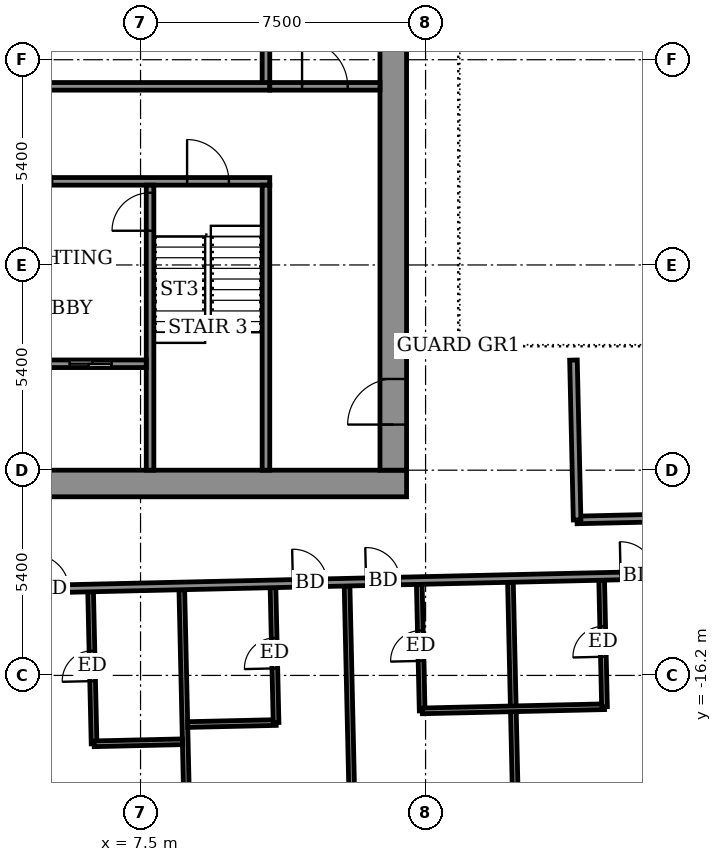
"""IFC4 building model, lengths in metres.
Left out: names, types, materials, properties, quantities, classifications, styles, units other than length and angle.
Written with IfcOpenShell. Run it as: python <this file> out.ifc"""

import sys

from ifc_helpers import new_model, si_unit, direction, frame, frame_2d, origin, place, context, subcontext, project, spatial, rectangle, extrude, element, fill, save


model = new_model("IFC4")
c1 = context("Model", 3, precision=1e-05, world=origin(), true_north=direction((0.0, 1.0)))
c2 = subcontext(c1, "Body", "Model", "MODEL_VIEW")
j1 = project(units=[si_unit("LENGTHUNIT", "METRE"), si_unit("PLANEANGLEUNIT", "RADIAN")], contexts=[c1])
p1 = place(None, origin())
s1 = spatial("IfcSite", under=j1, at=p1, CompositionType="ELEMENT")
p2 = place(p1, origin())
s2 = spatial("IfcBuilding", under=s1, at=p2, CompositionType="ELEMENT")
p3 = place(p2, frame((0.0, 0.0, 287.1)))
s3 = spatial("IfcBuildingStorey", under=s2, at=p3, CompositionType="ELEMENT", Elevation=287.1)
p4 = place(p3, frame((8.82, -24.293, 0.0), z_axis=(0.0, 0.0, 1.0), x_axis=(-0.022622273571, 0.999744083623, 0.0)))
e1 = element("IfcWall", 1, at=p4, inside=s3, PredefinedType="PARTITIONING", context=c2, shape_type="SweptSolid", body=[
    extrude(rectangle(XDim=10.35, YDim=0.15, at=frame_2d((5.175, 0.0))), origin(), (0.0, 0.0, 1.0), 2.5),
])
p5 = place(p3, frame((13.169, -24.194, 0.0), z_axis=(0.0, 0.0, 1.0), x_axis=(-0.022692470342, 0.99974249274, 0.0)))
e2 = element("IfcWall", 2, at=p5, inside=s3, PredefinedType="PARTITIONING", context=c2, shape_type="SweptSolid", body=[
    extrude(rectangle(XDim=10.35, YDim=0.15, at=frame_2d((5.175, 0.0))), origin(), (0.0, 0.0, 1.0), 2.5),
])
p6 = place(p3, frame((17.468, -24.097, 0.0), z_axis=(0.0, 0.0, 1.0), x_axis=(-0.022714440015, 0.999741993824, 0.0)))
e3 = element("IfcWall", 3, at=p6, inside=s3, PredefinedType="PARTITIONING", context=c2, shape_type="SweptSolid", body=[
    extrude(rectangle(XDim=10.351, YDim=0.15, at=frame_2d((5.175, 0.0))), origin(), (0.0, 0.0, 1.0), 2.5),
])
p7 = place(p3, frame((6.277, -17.999, 0.0), z_axis=(0.0, 0.0, 1.0), x_axis=(-0.022765770952, 0.999740826251, 0.0)))
e4 = element("IfcWall", 4, at=p7, inside=s3, PredefinedType="PARTITIONING", context=c2, shape_type="SweptSolid", body=[
    extrude(rectangle(XDim=4.0, YDim=0.15, at=frame_2d((2.0, 0.0))), origin(), (0.0, 0.0, 1.0), 3.05),
])
p8 = place(p7, frame((1.65, 0.0, 0.0)))
e5 = element("IfcOpeningElement", 5, at=p8, cuts=e4, PredefinedType="OPENING", context=c2, shape_type="SweptSolid", body=[
    extrude(rectangle(XDim=0.8, YDim=2.1, at=frame_2d((0.4, 1.05))), frame((0.0, 0.085, 0.0), z_axis=(0.0, -1.0, 0.0), x_axis=(1.0, 0.0, 0.0)), (0.0, 0.0, 1.0), 0.17),
])
p9 = place(p3, frame((6.279, -17.999, 0.0), z_axis=(0.0, 0.0, 1.0), x_axis=(0.999740260747, 0.02279059109, 0.0)))
e6 = element("IfcWall", 6, at=p9, inside=s3, PredefinedType="PARTITIONING", context=c2, shape_type="SweptSolid", body=[
    extrude(rectangle(XDim=2.324, YDim=0.15, at=frame_2d((1.162, 0.0))), origin(), (0.0, 0.0, 1.0), 3.05),
])
p10 = place(p3, frame((8.743, -17.493, 0.0), z_axis=(0.0, 0.0, 1.0), x_axis=(0.99974053329, 0.022778632478, 0.0)))
e7 = element("IfcWall", 7, at=p10, inside=s3, PredefinedType="PARTITIONING", context=c2, shape_type="SweptSolid", body=[
    extrude(rectangle(XDim=2.326, YDim=0.15, at=frame_2d((1.163, 0.0))), origin(), (0.0, 0.0, 1.0), 3.05),
])
p11 = place(p3, frame((11.066, -17.44, 0.0), z_axis=(0.0, 0.0, 1.0), x_axis=(-0.022765149847, 0.999740840394, 0.0)))
e8 = element("IfcWall", 8, at=p11, inside=s3, PredefinedType="PARTITIONING", context=c2, shape_type="SweptSolid", body=[
    extrude(rectangle(XDim=3.55, YDim=0.15, at=frame_2d((1.775, 0.0))), origin(), (0.0, 0.0, 1.0), 3.05),
])
p12 = place(p11, frame((1.425, 0.0, 0.0)))
e9 = element("IfcOpeningElement", 9, at=p12, cuts=e8, PredefinedType="OPENING", context=c2, shape_type="SweptSolid", body=[
    extrude(rectangle(XDim=0.8, YDim=2.1, at=frame_2d((0.4, 1.05))), frame((0.0, 0.085, 0.0), z_axis=(0.0, -1.0, 0.0), x_axis=(1.0, 0.0, 0.0)), (0.0, 0.0, 1.0), 0.17),
])
p13 = place(p3, frame((14.91, -17.133, 0.0), z_axis=(0.0, 0.0, 1.0), x_axis=(-0.022801345323, 0.99974001553, 0.0)))
e10 = element("IfcWall", 10, at=p13, inside=s3, PredefinedType="PARTITIONING", context=c2, shape_type="SweptSolid", body=[
    extrude(rectangle(XDim=3.33, YDim=0.15, at=frame_2d((1.665, 0.0))), origin(), (0.0, 0.0, 1.0), 3.05),
])
p14 = place(p13, frame((1.315, 0.0, 0.0)))
e11 = element("IfcOpeningElement", 11, at=p14, cuts=e10, PredefinedType="OPENING", context=c2, shape_type="SweptSolid", body=[
    extrude(rectangle(XDim=0.8, YDim=2.1, at=frame_2d((0.4, 1.05))), frame((0.0, 0.085, 0.0), z_axis=(0.0, -1.0, 0.0), x_axis=(1.0, 0.0, 0.0)), (0.0, 0.0, 1.0), 0.17),
])
p15 = place(p3, frame((14.912, -17.133, 0.0), z_axis=(0.0, 0.0, 1.0), x_axis=(0.999741415159, 0.022739894798, 0.0)))
e12 = element("IfcWall", 12, at=p15, inside=s3, PredefinedType="PARTITIONING", context=c2, shape_type="SweptSolid", body=[
    extrude(rectangle(XDim=4.799, YDim=0.15, at=frame_2d((2.399, 0.0))), origin(), (0.0, 0.0, 1.0), 3.05),
])
p16 = place(p3, frame((19.708, -17.024, 0.0), z_axis=(0.0, 0.0, 1.0), x_axis=(-0.022509879905, 0.999746620553, 0.0)))
e13 = element("IfcWall", 13, at=p16, inside=s3, PredefinedType="PARTITIONING", context=c2, shape_type="SweptSolid", body=[
    extrude(rectangle(XDim=3.33, YDim=0.15, at=frame_2d((1.665, 0.0))), origin(), (0.0, 0.0, 1.0), 3.05),
])
p17 = place(p16, frame((1.315, 0.0, 0.0)))
e14 = element("IfcOpeningElement", 14, at=p17, cuts=e13, PredefinedType="OPENING", context=c2, shape_type="SweptSolid", body=[
    extrude(rectangle(XDim=0.8, YDim=2.1, at=frame_2d((0.4, 1.05))), frame((0.0, 0.085, 0.0), z_axis=(0.0, -1.0, 0.0), x_axis=(1.0, 0.0, 0.0)), (0.0, 0.0, 1.0), 0.17),
])
p18 = place(p3, frame((-25.731, -14.624, 0.0), z_axis=(0.0, 0.0, 1.0), x_axis=(0.999742799525, 0.022678950563, 0.0)))
e15 = element("IfcWall", 15, at=p18, inside=s3, PredefinedType="PARTITIONING", context=c2, shape_type="SweptSolid", body=[
    extrude(rectangle(XDim=55.386, YDim=0.2, at=frame_2d((27.693, 0.0))), origin(), (0.0, 0.0, 1.0), 3.05),
])
p19 = place(p18, frame((3.149, 0.0, 0.0)))
e16 = element("IfcOpeningElement", 16, at=p19, cuts=e15, PredefinedType="OPENING", context=c2, shape_type="SweptSolid", body=[
    extrude(rectangle(XDim=1.0, YDim=2.1, at=frame_2d((0.5, 1.05))), frame((0.0, 0.11, 0.0), z_axis=(0.0, -1.0, 0.0), x_axis=(1.0, 0.0, 0.0)), (0.0, 0.0, 1.0), 0.22),
])
p20 = place(p18, frame((11.1, 0.0, 0.0)))
e17 = element("IfcOpeningElement", 17, at=p20, cuts=e15, PredefinedType="OPENING", context=c2, shape_type="SweptSolid", body=[
    extrude(rectangle(XDim=0.9, YDim=2.1, at=frame_2d((0.45, 1.05))), frame((0.0, 0.11, 0.0), z_axis=(0.0, -1.0, 0.0), x_axis=(1.0, 0.0, 0.0)), (0.0, 0.0, 1.0), 0.22),
])
p21 = place(p18, frame((12.95, 0.0, 0.0)))
e18 = element("IfcOpeningElement", 18, at=p21, cuts=e15, PredefinedType="OPENING", context=c2, shape_type="SweptSolid", body=[
    extrude(rectangle(XDim=0.9, YDim=2.1, at=frame_2d((0.45, 1.05))), frame((0.0, 0.11, 0.0), z_axis=(0.0, -1.0, 0.0), x_axis=(1.0, 0.0, 0.0)), (0.0, 0.0, 1.0), 0.22),
])
p22 = place(p18, frame((19.675, 0.0, 0.0)))
e19 = element("IfcOpeningElement", 19, at=p22, cuts=e15, PredefinedType="OPENING", context=c2, shape_type="SweptSolid", body=[
    extrude(rectangle(XDim=0.9, YDim=2.1, at=frame_2d((0.45, 1.05))), frame((0.0, 0.11, 0.0), z_axis=(0.0, -1.0, 0.0), x_axis=(1.0, 0.0, 0.0)), (0.0, 0.0, 1.0), 0.22),
])
p23 = place(p18, frame((21.7, 0.0, 0.0)))
e20 = element("IfcOpeningElement", 20, at=p23, cuts=e15, PredefinedType="OPENING", context=c2, shape_type="SweptSolid", body=[
    extrude(rectangle(XDim=0.9, YDim=2.1, at=frame_2d((0.45, 1.05))), frame((0.0, 0.11, 0.0), z_axis=(0.0, -1.0, 0.0), x_axis=(1.0, 0.0, 0.0)), (0.0, 0.0, 1.0), 0.22),
])
p24 = place(p18, frame((28.475, 0.0, 0.0)))
e21 = element("IfcOpeningElement", 21, at=p24, cuts=e15, PredefinedType="OPENING", context=c2, shape_type="SweptSolid", body=[
    extrude(rectangle(XDim=0.9, YDim=2.1, at=frame_2d((0.45, 1.05))), frame((0.0, 0.11, 0.0), z_axis=(0.0, -1.0, 0.0), x_axis=(1.0, 0.0, 0.0)), (0.0, 0.0, 1.0), 0.22),
])
p25 = place(p18, frame((30.45, 0.0, 0.0)))
e22 = element("IfcOpeningElement", 22, at=p25, cuts=e15, PredefinedType="OPENING", context=c2, shape_type="SweptSolid", body=[
    extrude(rectangle(XDim=0.9, YDim=2.1, at=frame_2d((0.45, 1.05))), frame((0.0, 0.11, 0.0), z_axis=(0.0, -1.0, 0.0), x_axis=(1.0, 0.0, 0.0)), (0.0, 0.0, 1.0), 0.22),
])
p26 = place(p18, frame((37.25, 0.0, 0.0)))
e23 = element("IfcOpeningElement", 23, at=p26, cuts=e15, PredefinedType="OPENING", context=c2, shape_type="SweptSolid", body=[
    extrude(rectangle(XDim=0.9, YDim=2.1, at=frame_2d((0.45, 1.05))), frame((0.0, 0.11, 0.0), z_axis=(0.0, -1.0, 0.0), x_axis=(1.0, 0.0, 0.0)), (0.0, 0.0, 1.0), 0.22),
])
p27 = place(p18, frame((39.175, 0.0, 0.0)))
e24 = element("IfcOpeningElement", 24, at=p27, cuts=e15, PredefinedType="OPENING", context=c2, shape_type="SweptSolid", body=[
    extrude(rectangle(XDim=0.9, YDim=2.1, at=frame_2d((0.45, 1.05))), frame((0.0, 0.11, 0.0), z_axis=(0.0, -1.0, 0.0), x_axis=(1.0, 0.0, 0.0)), (0.0, 0.0, 1.0), 0.22),
])
p28 = place(p18, frame((45.875, 0.0, 0.0)))
e25 = element("IfcOpeningElement", 25, at=p28, cuts=e15, PredefinedType="OPENING", context=c2, shape_type="SweptSolid", body=[
    extrude(rectangle(XDim=0.9, YDim=2.1, at=frame_2d((0.45, 1.05))), frame((0.0, 0.11, 0.0), z_axis=(0.0, -1.0, 0.0), x_axis=(1.0, 0.0, 0.0)), (0.0, 0.0, 1.0), 0.22),
])
p29 = place(p18, frame((51.127, 0.0, 0.0)))
e26 = element("IfcOpeningElement", 26, at=p29, cuts=e15, PredefinedType="OPENING", context=c2, shape_type="SweptSolid", body=[
    extrude(rectangle(XDim=1.0, YDim=2.1, at=frame_2d((0.5, 1.05))), frame((0.0, 0.11, 0.0), z_axis=(0.0, -1.0, 0.0), x_axis=(1.0, 0.0, 0.0)), (0.0, 0.0, 1.0), 0.22),
])
p30 = place(p3, frame((18.985, -12.109, 0.0), z_axis=(0.0, 0.0, 1.0), x_axis=(0.999742771882, 0.022680169073, 0.0)))
e27 = element("IfcWall", 27, at=p30, inside=s3, PredefinedType="PARTITIONING", context=c2, shape_type="SweptSolid", body=[
    extrude(rectangle(XDim=10.625, YDim=0.2, at=frame_2d((5.312, 0.0))), origin(), (0.0, 0.0, 1.0), 3.05),
])
p31 = place(p30, frame((5.75, 0.0, 0.0)))
e28 = element("IfcOpeningElement", 28, at=p31, cuts=e27, PredefinedType="OPENING", context=c2, shape_type="SweptSolid", body=[
    extrude(rectangle(XDim=1.0, YDim=2.1, at=frame_2d((0.5, 1.05))), frame((0.0, 0.11, 0.0), z_axis=(0.0, -1.0, 0.0), x_axis=(1.0, 0.0, 0.0)), (0.0, 0.0, 1.0), 0.22),
])
p32 = place(p3, frame((18.987, -12.109, 0.0), z_axis=(0.0, 0.0, 1.0), x_axis=(-0.022807092041, 0.999739884446, 0.0)))
e29 = element("IfcWall", 29, at=p32, inside=s3, PredefinedType="PARTITIONING", context=c2, shape_type="SweptSolid", body=[
    extrude(rectangle(XDim=4.207, YDim=0.2, at=frame_2d((2.104, 0.0))), origin(), (0.0, 0.0, 1.0), 3.05),
])
p33 = place(p3, frame((-14.5, -11.15, 0.0), z_axis=(0.0, 0.0, 1.0), x_axis=(1.0, 0.0, 0.0)))
e30 = element("IfcWall", 30, at=p33, inside=s3, PredefinedType="SHEAR", context=c2, shape_type="SweptSolid", body=[
    extrude(rectangle(XDim=29.0, YDim=0.7, at=frame_2d((14.5, 0.0))), origin(), (0.0, 0.0, 1.0), 3.6),
])
p34 = place(p3, frame((14.15, -10.8, 0.0), z_axis=(0.0, 0.0, 1.0), x_axis=(0.0, 1.0, 0.0)))
e31 = element("IfcWall", 31, at=p34, inside=s3, PredefinedType="SHEAR", context=c2, shape_type="SweptSolid", body=[
    extrude(rectangle(XDim=21.6, YDim=0.7, at=frame_2d((10.8, 0.0))), origin(), (0.0, 0.0, 1.0), 3.6),
])
p35 = place(p34, frame((1.2, 0.0, 0.0)))
e32 = element("IfcOpeningElement", 32, at=p35, cuts=e31, PredefinedType="OPENING", context=c2, shape_type="SweptSolid", body=[
    extrude(rectangle(XDim=1.2, YDim=2.1, at=frame_2d((0.6, 1.05))), frame((0.0, 0.36, 0.0), z_axis=(0.0, -1.0, 0.0), x_axis=(1.0, 0.0, 0.0)), (0.0, 0.0, 1.0), 0.72),
])
p36 = place(p3, frame((-10.9, -3.2, 0.0), z_axis=(0.0, 0.0, 1.0), x_axis=(1.0, 0.0, 0.0)))
e33 = element("IfcWall", 33, at=p36, inside=s3, PredefinedType="SHEAR", context=c2, shape_type="SweptSolid", body=[
    extrude(rectangle(XDim=21.8, YDim=0.2, at=frame_2d((10.9, 0.0))), origin(), (0.0, 0.0, 1.0), 3.05),
])
p37 = place(p36, frame((1.075, 0.0, 0.0)))
e34 = element("IfcOpeningElement", 34, at=p37, cuts=e33, PredefinedType="OPENING", context=c2, shape_type="SweptSolid", body=[
    extrude(rectangle(XDim=1.1, YDim=2.1, at=frame_2d((0.55, 1.05))), frame((0.0, 0.11, 0.0), z_axis=(0.0, -1.0, 0.0), x_axis=(1.0, 0.0, 0.0)), (0.0, 0.0, 1.0), 0.22),
])
p38 = place(p36, frame((10.325, 0.0, 0.0)))
e35 = element("IfcOpeningElement", 35, at=p38, cuts=e33, PredefinedType="OPENING", context=c2, shape_type="SweptSolid", body=[
    extrude(rectangle(XDim=1.1, YDim=2.1, at=frame_2d((0.55, 1.05))), frame((0.0, 0.11, 0.0), z_axis=(0.0, -1.0, 0.0), x_axis=(1.0, 0.0, 0.0)), (0.0, 0.0, 1.0), 0.22),
])
p39 = place(p36, frame((19.625, 0.0, 0.0)))
e36 = element("IfcOpeningElement", 36, at=p39, cuts=e33, PredefinedType="OPENING", context=c2, shape_type="SweptSolid", body=[
    extrude(rectangle(XDim=1.1, YDim=2.1, at=frame_2d((0.55, 1.05))), frame((0.0, 0.11, 0.0), z_axis=(0.0, -1.0, 0.0), x_axis=(1.0, 0.0, 0.0)), (0.0, 0.0, 1.0), 0.22),
])
p40 = place(p36, frame((5.7, 0.0, 0.0)))
e37 = element("IfcOpeningElement", 37, at=p40, cuts=e33, PredefinedType="OPENING", context=c2, shape_type="SweptSolid", body=[
    extrude(rectangle(XDim=1.1, YDim=2.1, at=frame_2d((0.55, 1.05))), frame((0.0, 0.11, 0.0), z_axis=(0.0, -1.0, 0.0), x_axis=(1.0, 0.0, 0.0)), (0.0, 0.0, 1.0), 0.22),
])
p41 = place(p36, frame((14.975, 0.0, 0.0)))
e38 = element("IfcOpeningElement", 38, at=p41, cuts=e33, PredefinedType="OPENING", context=c2, shape_type="SweptSolid", body=[
    extrude(rectangle(XDim=1.1, YDim=2.1, at=frame_2d((0.55, 1.05))), frame((0.0, 0.11, 0.0), z_axis=(0.0, -1.0, 0.0), x_axis=(1.0, 0.0, 0.0)), (0.0, 0.0, 1.0), 0.22),
])
p42 = place(p3, frame((-10.9, -0.7, 0.0), z_axis=(0.0, 0.0, 1.0), x_axis=(1.0, 0.0, 0.0)))
e39 = element("IfcWall", 39, at=p42, inside=s3, PredefinedType="SHEAR", context=c2, shape_type="SweptSolid", body=[
    extrude(rectangle(XDim=21.8, YDim=0.2, at=frame_2d((10.9, 0.0))), origin(), (0.0, 0.0, 1.0), 3.05),
])
p43 = place(p3, frame((7.75, -10.8, 0.0), z_axis=(0.0, 0.0, 1.0), x_axis=(0.0, 1.0, 0.0)))
e40 = element("IfcWall", 40, at=p43, inside=s3, PredefinedType="SHEAR", context=c2, shape_type="SweptSolid", body=[
    extrude(rectangle(XDim=7.5, YDim=0.2, at=frame_2d((3.75, 0.0))), origin(), (0.0, 0.0, 1.0), 3.05),
])
p44 = place(p43, frame((6.3, 0.0, 0.0)))
e41 = element("IfcOpeningElement", 41, at=p44, cuts=e40, PredefinedType="OPENING", context=c2, shape_type="SweptSolid", body=[
    extrude(rectangle(XDim=1.0, YDim=2.1, at=frame_2d((0.5, 1.05))), frame((0.0, 0.11, 0.0), z_axis=(0.0, -1.0, 0.0), x_axis=(1.0, 0.0, 0.0)), (0.0, 0.0, 1.0), 0.22),
])
p45 = place(p3, frame((10.8, -10.8, 0.0), z_axis=(0.0, 0.0, 1.0), x_axis=(0.0, 1.0, 0.0)))
e42 = element("IfcWall", 42, at=p45, inside=s3, PredefinedType="SHEAR", context=c2, shape_type="SweptSolid", body=[
    extrude(rectangle(XDim=7.5, YDim=0.2, at=frame_2d((3.75, 0.0))), origin(), (0.0, 0.0, 1.0), 3.05),
])
p46 = place(p3, frame((1.6, -8.0, 0.0), z_axis=(0.0, 0.0, 1.0), x_axis=(1.0, 0.0, 0.0)))
e43 = element("IfcWall", 43, at=p46, inside=s3, PredefinedType="SHEAR", context=c2, shape_type="SweptSolid", body=[
    extrude(rectangle(XDim=6.05, YDim=0.2, at=frame_2d((3.025, 0.0))), origin(), (0.0, 0.0, 1.0), 3.05),
])
p47 = place(p46, frame((0.913, 0.0, 0.0)))
e44 = element("IfcOpeningElement", 44, at=p47, cuts=e43, PredefinedType="OPENING", context=c2, shape_type="SweptSolid", body=[
    extrude(rectangle(XDim=1.1, YDim=2.1, at=frame_2d((0.55, 1.05))), frame((0.0, 0.11, 0.0), z_axis=(0.0, -1.0, 0.0), x_axis=(1.0, 0.0, 0.0)), (0.0, 0.0, 1.0), 0.22),
])
p48 = place(p46, frame((4.038, 0.0, 0.0)))
e45 = element("IfcOpeningElement", 45, at=p48, cuts=e43, PredefinedType="OPENING", context=c2, shape_type="SweptSolid", body=[
    extrude(rectangle(XDim=1.1, YDim=2.1, at=frame_2d((0.55, 1.05))), frame((0.0, 0.11, 0.0), z_axis=(0.0, -1.0, 0.0), x_axis=(1.0, 0.0, 0.0)), (0.0, 0.0, 1.0), 0.22),
])
p49 = place(p3, frame((10.8, -0.6, 0.0), z_axis=(0.0, 0.0, 1.0), x_axis=(0.0, 1.0, 0.0)))
e46 = element("IfcWall", 46, at=p49, inside=s3, PredefinedType="STANDARD", context=c2, shape_type="SweptSolid", body=[
    extrude(rectangle(XDim=2.5, YDim=0.2, at=frame_2d((1.25, 0.0))), origin(), (0.0, 0.0, 1.0), 3.05),
])
p50 = place(p3, frame((10.9, -0.7, 0.0), z_axis=(0.0, 0.0, 1.0), x_axis=(1.0, 0.0, 0.0)))
e47 = element("IfcWall", 47, at=p50, inside=s3, PredefinedType="STANDARD", context=c2, shape_type="SweptSolid", body=[
    extrude(rectangle(XDim=2.9, YDim=0.2, at=frame_2d((1.45, 0.0))), origin(), (0.0, 0.0, 1.0), 3.05),
])
p51 = place(p50, frame((0.85, 0.0, 0.0)))
e48 = element("IfcOpeningElement", 48, at=p51, cuts=e47, PredefinedType="OPENING", context=c2, shape_type="SweptSolid", body=[
    extrude(rectangle(XDim=1.2, YDim=2.1, at=frame_2d((0.6, 1.05))), frame((0.0, 0.11, 0.0), z_axis=(0.0, -1.0, 0.0), x_axis=(1.0, 0.0, 0.0)), (0.0, 0.0, 1.0), 0.22),
])
p52 = place(p25, origin())
e49 = element("IfcDoor", 49, at=p52, inside=s3, OperationType="SINGLE_SWING_RIGHT", PredefinedType="DOOR", context=c2, shape_type="SweptSolid", body=[
    extrude(rectangle(XDim=0.9, YDim=2.1, at=frame_2d((0.45, 1.05))), frame((0.0, 0.025, 0.0), z_axis=(0.0, -1.0, 0.0), x_axis=(1.0, 0.0, 0.0)), (0.0, 0.0, 1.0), 0.05),
])
fill(e22, e49)
p53 = place(p8, origin())
e50 = element("IfcDoor", 50, at=p53, inside=s3, OperationType="SINGLE_SWING_RIGHT", PredefinedType="DOOR", context=c2, shape_type="SweptSolid", body=[
    extrude(rectangle(XDim=0.8, YDim=2.1, at=frame_2d((0.4, 1.05))), frame((0.0, 0.025, 0.0), z_axis=(0.0, -1.0, 0.0), x_axis=(1.0, 0.0, 0.0)), (0.0, 0.0, 1.0), 0.05),
])
fill(e5, e50)
p54 = place(p26, origin())
e51 = element("IfcDoor", 51, at=p54, inside=s3, OperationType="SINGLE_SWING_LEFT", PredefinedType="DOOR", context=c2, shape_type="SweptSolid", body=[
    extrude(rectangle(XDim=0.9, YDim=2.1, at=frame_2d((0.45, 1.05))), frame((0.0, 0.025, 0.0), z_axis=(0.0, -1.0, 0.0), x_axis=(1.0, 0.0, 0.0)), (0.0, 0.0, 1.0), 0.05),
])
fill(e23, e51)
p55 = place(p12, origin())
e52 = element("IfcDoor", 52, at=p55, inside=s3, OperationType="SINGLE_SWING_LEFT", PredefinedType="DOOR", context=c2, shape_type="SweptSolid", body=[
    extrude(rectangle(XDim=0.8, YDim=2.1, at=frame_2d((0.4, 1.05))), frame((0.0, 0.025, 0.0), z_axis=(0.0, -1.0, 0.0), x_axis=(1.0, 0.0, 0.0)), (0.0, 0.0, 1.0), 0.05),
])
fill(e9, e52)
p56 = place(p27, origin())
e53 = element("IfcDoor", 53, at=p56, inside=s3, OperationType="SINGLE_SWING_RIGHT", PredefinedType="DOOR", context=c2, shape_type="SweptSolid", body=[
    extrude(rectangle(XDim=0.9, YDim=2.1, at=frame_2d((0.45, 1.05))), frame((0.0, 0.025, 0.0), z_axis=(0.0, -1.0, 0.0), x_axis=(1.0, 0.0, 0.0)), (0.0, 0.0, 1.0), 0.05),
])
fill(e24, e53)
p57 = place(p14, origin())
e54 = element("IfcDoor", 54, at=p57, inside=s3, OperationType="SINGLE_SWING_RIGHT", PredefinedType="DOOR", context=c2, shape_type="SweptSolid", body=[
    extrude(rectangle(XDim=0.8, YDim=2.1, at=frame_2d((0.4, 1.05))), frame((0.0, 0.025, 0.0), z_axis=(0.0, -1.0, 0.0), x_axis=(1.0, 0.0, 0.0)), (0.0, 0.0, 1.0), 0.05),
])
fill(e11, e54)
p58 = place(p28, origin())
e55 = element("IfcDoor", 55, at=p58, inside=s3, OperationType="SINGLE_SWING_LEFT", PredefinedType="DOOR", context=c2, shape_type="SweptSolid", body=[
    extrude(rectangle(XDim=0.9, YDim=2.1, at=frame_2d((0.45, 1.05))), frame((0.0, 0.025, 0.0), z_axis=(0.0, -1.0, 0.0), x_axis=(1.0, 0.0, 0.0)), (0.0, 0.0, 1.0), 0.05),
])
fill(e25, e55)
p59 = place(p17, origin())
e56 = element("IfcDoor", 56, at=p59, inside=s3, OperationType="SINGLE_SWING_LEFT", PredefinedType="DOOR", context=c2, shape_type="SweptSolid", body=[
    extrude(rectangle(XDim=0.8, YDim=2.1, at=frame_2d((0.4, 1.05))), frame((0.0, 0.025, 0.0), z_axis=(0.0, -1.0, 0.0), x_axis=(1.0, 0.0, 0.0)), (0.0, 0.0, 1.0), 0.05),
])
fill(e14, e56)
p60 = place(p35, origin())
e57 = element("IfcDoor", 57, at=p60, inside=s3, OperationType="DOUBLE_DOOR_SINGLE_SWING", PredefinedType="DOOR", context=c2, shape_type="SweptSolid", body=[
    extrude(rectangle(XDim=1.2, YDim=2.1, at=frame_2d((0.6, 1.05))), frame((0.0, 0.025, 0.0), z_axis=(0.0, -1.0, 0.0), x_axis=(1.0, 0.0, 0.0)), (0.0, 0.0, 1.0), 0.05),
])
fill(e32, e57)
p61 = place(p48, origin())
e58 = element("IfcDoor", 58, at=p61, inside=s3, OperationType="SLIDING_TO_LEFT", PredefinedType="DOOR", context=c2, shape_type="SweptSolid", body=[
    extrude(rectangle(XDim=1.1, YDim=2.1, at=frame_2d((0.55, 1.05))), frame((0.0, 0.025, 0.0), z_axis=(0.0, -1.0, 0.0), x_axis=(1.0, 0.0, 0.0)), (0.0, 0.0, 1.0), 0.05),
])
fill(e45, e58)
p62 = place(p39, origin())
e59 = element("IfcDoor", 59, at=p62, inside=s3, OperationType="SINGLE_SWING_RIGHT", PredefinedType="DOOR", context=c2, shape_type="SweptSolid", body=[
    extrude(rectangle(XDim=1.1, YDim=2.1, at=frame_2d((0.55, 1.05))), frame((0.0, 0.025, 0.0), z_axis=(0.0, -1.0, 0.0), x_axis=(1.0, 0.0, 0.0)), (0.0, 0.0, 1.0), 0.05),
])
fill(e36, e59)
p63 = place(p44, origin())
e60 = element("IfcDoor", 60, at=p63, inside=s3, OperationType="SINGLE_SWING_RIGHT", PredefinedType="DOOR", context=c2, shape_type="SweptSolid", body=[
    extrude(rectangle(XDim=1.0, YDim=2.1, at=frame_2d((0.5, 1.05))), frame((0.0, 0.025, 0.0), z_axis=(0.0, -1.0, 0.0), x_axis=(1.0, 0.0, 0.0)), (0.0, 0.0, 1.0), 0.05),
])
fill(e41, e60)
p64 = place(p51, origin())
e61 = element("IfcDoor", 61, at=p64, inside=s3, OperationType="SINGLE_SWING_LEFT", PredefinedType="DOOR", context=c2, shape_type="SweptSolid", body=[
    extrude(rectangle(XDim=1.2, YDim=2.1, at=frame_2d((0.6, 1.05))), frame((0.0, 0.025, 0.0), z_axis=(0.0, -1.0, 0.0), x_axis=(1.0, 0.0, 0.0)), (0.0, 0.0, 1.0), 0.05),
])
fill(e48, e61)
save(model, sys.argv[1])
